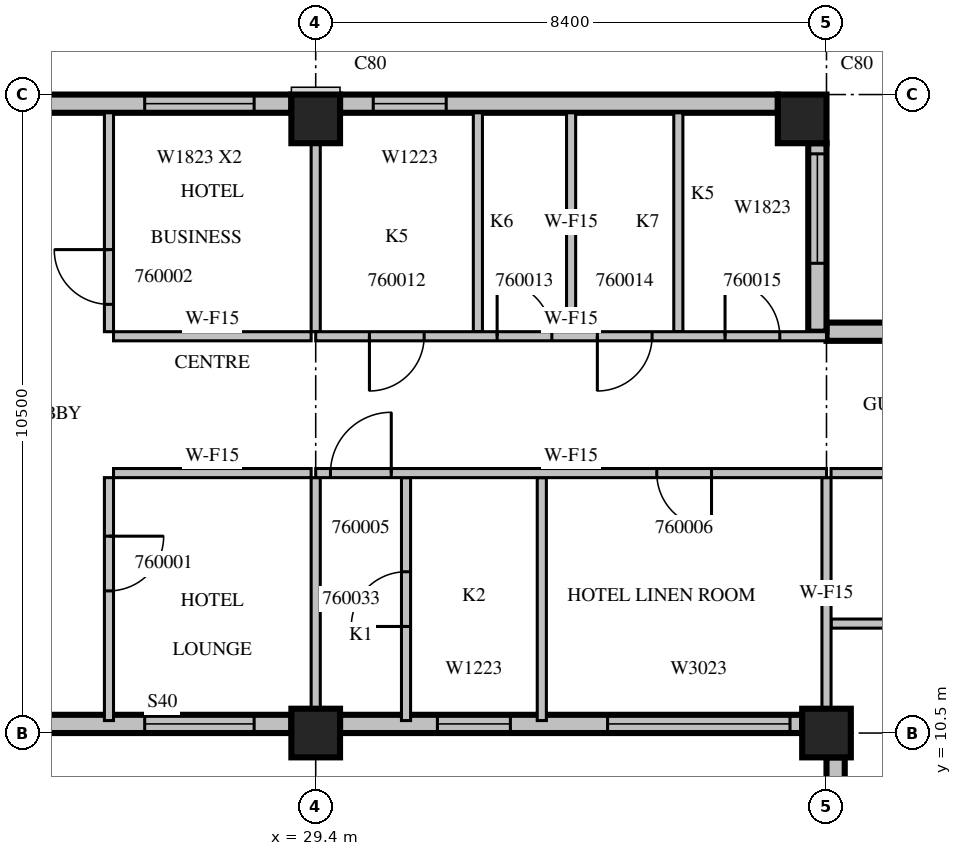
"""IFC4 building model, lengths in metres.
Left out: names, types, materials, properties, quantities, classifications, styles, units other than length and angle.
Written with IfcOpenShell. Run it as: python <this file> out.ifc"""

import sys

from ifc_helpers import new_model, si_unit, direction, frame, frame_2d, origin, origin_2d, place, context, subcontext, project, spatial, rectangle, extrude, source, transform, mapped, element, fill, save


model = new_model("IFC4")
c1 = context("Model", 3, precision=1e-05, world=origin(), true_north=direction((0.0, 1.0)))
c2 = subcontext(c1, "Body", "Model", "MODEL_VIEW")
j1 = project(units=[si_unit("LENGTHUNIT", "METRE"), si_unit("PLANEANGLEUNIT", "RADIAN")], contexts=[c1])
p1 = place(None, origin())
s1 = spatial("IfcSite", under=j1, at=p1, CompositionType="ELEMENT")
p2 = place(p1, origin())
s2 = spatial("IfcBuilding", under=s1, at=p2, CompositionType="ELEMENT")
p3 = place(p2, frame((0.0, 0.0, 261.4)))
s3 = spatial("IfcBuildingStorey", under=s2, at=p3, CompositionType="ELEMENT", Elevation=261.4)
m1 = source(origin(), c2, "Body", "SweptSolid", [
    extrude(rectangle(XDim=0.8, YDim=0.8, at=origin_2d()), origin(), (0.0, 0.0, 1.0), 3.8),
])
for number, where, z_axis, x_axis in (
    (1, (29.4, 10.5, 0.0), (0.0, 0.0, 1.0), (1.0, 0.0, 0.0)),
    (2, (37.8, 10.5, 0.0), (0.0, 0.0, 1.0), (1.0, 0.0, 0.0)),
    (3, (29.4, 20.6, 0.0), (0.0, 0.0, 1.0), (1.0, 0.0, 0.0)),
    (4, (37.4, 20.6, 0.0), (0.0, 0.0, 1.0), (1.0, 0.0, 0.0)),
):
    element("IfcColumn", number, at=place(p3, frame(where, z_axis=z_axis, x_axis=x_axis)), inside=s3, PredefinedType="COLUMN", context=c2, shape_type="MappedRepresentation", body=[
        mapped(m1, transform((0.0, 0.0, 0.0), scale=1.0)),
    ])
m2 = source(origin(), c2, "Body", "SweptSolid", [
    extrude(rectangle(XDim=7.2, YDim=0.3, at=frame_2d((3.6, 0.0))), origin(), (0.0, 0.0, 1.0), 3.4),
])
p4 = place(p3, frame((21.8, 10.65, 0.0), z_axis=(0.0, 0.0, 1.0), x_axis=(1.0, 0.0, 0.0)))
e5 = element("IfcWall", 5, at=p4, inside=s3, PredefinedType="STANDARD", context=c2, shape_type="MappedRepresentation", body=[
    mapped(m2, transform((0.0, 0.0, 0.0), scale=1.0)),
])
m3 = source(origin(), c2, "Body", "SweptSolid", [
    extrude(rectangle(XDim=1.8, YDim=2.3, at=frame_2d((0.9, 1.15))), frame((0.0, 0.16, 0.0), z_axis=(0.0, -1.0, 0.0), x_axis=(1.0, 0.0, 0.0)), (0.0, 0.0, 1.0), 0.32),
])
p5 = place(p4, frame((0.4, 0.0, 0.6)))
e6 = element("IfcOpeningElement", 6, at=p5, cuts=e5, PredefinedType="OPENING", context=c2, shape_type="MappedRepresentation", body=[
    mapped(m3, transform((0.0, 0.0, 0.0), scale=1.0)),
])
p6 = place(p4, frame((4.787, 0.0, 0.6)))
e7 = element("IfcOpeningElement", 7, at=p6, cuts=e5, PredefinedType="OPENING", context=c2, shape_type="MappedRepresentation", body=[
    mapped(m3, transform((0.0, 0.0, 0.0), scale=1.0)),
])
m4 = source(origin(), c2, "Body", "SweptSolid", [
    extrude(rectangle(XDim=7.6, YDim=0.3, at=frame_2d((3.8, 0.0))), origin(), (0.0, 0.0, 1.0), 3.4),
])
p7 = place(p3, frame((29.8, 10.65, 0.0), z_axis=(0.0, 0.0, 1.0), x_axis=(1.0, 0.0, 0.0)))
e8 = element("IfcWall", 8, at=p7, inside=s3, PredefinedType="STANDARD", context=c2, shape_type="MappedRepresentation", body=[
    mapped(m4, transform((0.0, 0.0, 0.0), scale=1.0)),
])
m5 = source(origin(), c2, "Body", "SweptSolid", [
    extrude(rectangle(XDim=1.2, YDim=2.3, at=frame_2d((0.6, 1.15))), frame((0.0, 0.16, 0.0), z_axis=(0.0, -1.0, 0.0), x_axis=(1.0, 0.0, 0.0)), (0.0, 0.0, 1.0), 0.32),
])
p8 = place(p7, frame((1.601, 0.0, 0.6)))
e9 = element("IfcOpeningElement", 9, at=p8, cuts=e8, PredefinedType="OPENING", context=c2, shape_type="MappedRepresentation", body=[
    mapped(m5, transform((0.0, 0.0, 0.0), scale=1.0)),
])
m6 = source(origin(), c2, "Body", "SweptSolid", [
    extrude(rectangle(XDim=3.0, YDim=2.3, at=frame_2d((1.5, 1.15))), frame((0.0, 0.16, 0.0), z_axis=(0.0, -1.0, 0.0), x_axis=(1.0, 0.0, 0.0)), (0.0, 0.0, 1.0), 0.32),
])
p9 = place(p7, frame((4.4, 0.0, 0.6)))
e10 = element("IfcOpeningElement", 10, at=p9, cuts=e8, PredefinedType="OPENING", context=c2, shape_type="MappedRepresentation", body=[
    mapped(m6, transform((0.0, 0.0, 0.0), scale=1.0)),
])
m7 = source(origin(), c2, "Body", "SweptSolid", [
    extrude(rectangle(XDim=9.3, YDim=0.3, at=frame_2d((4.65, 0.0))), origin(), (0.0, 0.0, 1.0), 3.4),
])
p10 = place(p3, frame((37.95, 10.1, 0.0), z_axis=(0.0, 0.0, 1.0), x_axis=(0.0, -1.0, 0.0)))
e11 = element("IfcWall", 11, at=p10, inside=s3, PredefinedType="STANDARD", context=c2, shape_type="MappedRepresentation", body=[
    mapped(m7, transform((0.0, 0.0, 0.0), scale=1.0)),
])
p11 = place(p10, frame((2.013, 0.0, 0.6)))
e12 = element("IfcOpeningElement", 12, at=p11, cuts=e11, PredefinedType="OPENING", context=c2, shape_type="MappedRepresentation", body=[
    mapped(m3, transform((0.0, 0.0, 0.0), scale=1.0)),
])
p12 = place(p10, frame((5.975, 0.0, 0.6)))
e13 = element("IfcOpeningElement", 13, at=p12, cuts=e11, PredefinedType="OPENING", context=c2, shape_type="MappedRepresentation", body=[
    mapped(m6, transform((0.0, 0.0, 0.0), scale=1.0)),
])
m8 = source(origin(), c2, "Body", "SweptSolid", [
    extrude(rectangle(XDim=15.96, YDim=0.3, at=frame_2d((7.98, 0.0))), origin(), (0.0, 0.0, 1.0), 3.4),
])
p13 = place(p3, frame((53.76, 17.1, 0.0), z_axis=(0.0, 0.0, 1.0), x_axis=(-1.0, 0.0, 0.0)))
e14 = element("IfcWall", 14, at=p13, inside=s3, PredefinedType="STANDARD", context=c2, shape_type="MappedRepresentation", body=[
    mapped(m8, transform((0.0, 0.0, 0.0), scale=1.0)),
])
p14 = place(p13, frame((0.6, 0.0, 0.6)))
e15 = element("IfcOpeningElement", 15, at=p14, cuts=e14, PredefinedType="OPENING", context=c2, shape_type="MappedRepresentation", body=[
    mapped(m6, transform((0.0, 0.0, 0.0), scale=1.0)),
])
p15 = place(p13, frame((4.8, 0.0, 0.6)))
e16 = element("IfcOpeningElement", 16, at=p15, cuts=e14, PredefinedType="OPENING", context=c2, shape_type="MappedRepresentation", body=[
    mapped(m6, transform((0.0, 0.0, 0.0), scale=1.0)),
])
m9 = source(origin(), c2, "Body", "SweptSolid", [
    extrude(rectangle(XDim=3.6, YDim=2.3, at=frame_2d((1.8, 1.15))), frame((0.0, 0.16, 0.0), z_axis=(0.0, -1.0, 0.0), x_axis=(1.0, 0.0, 0.0)), (0.0, 0.0, 1.0), 0.32),
])
p16 = place(p13, frame((9.54, 0.0, 0.6)))
e17 = element("IfcOpeningElement", 17, at=p16, cuts=e14, PredefinedType="OPENING", context=c2, shape_type="MappedRepresentation", body=[
    mapped(m9, transform((0.0, 0.0, 0.0), scale=1.0)),
])
m10 = source(origin(), c2, "Body", "SweptSolid", [
    extrude(rectangle(XDim=3.1, YDim=0.3, at=frame_2d((1.55, 0.0))), origin(), (0.0, 0.0, 1.0), 3.4),
])
p17 = place(p3, frame((37.65, 17.1, 0.0), z_axis=(0.0, 0.0, 1.0), x_axis=(0.0, 1.0, 0.0)))
e18 = element("IfcWall", 18, at=p17, inside=s3, PredefinedType="STANDARD", context=c2, shape_type="MappedRepresentation", body=[
    mapped(m10, transform((0.0, 0.0, 0.0), scale=1.0)),
])
p18 = place(p17, frame((1.125, 0.0, 0.6)))
e19 = element("IfcOpeningElement", 19, at=p18, cuts=e18, PredefinedType="OPENING", context=c2, shape_type="MappedRepresentation", body=[
    mapped(m3, transform((0.0, 0.0, 0.0), scale=1.0)),
])
p19 = place(p3, frame((37.0, 20.85, 0.0), z_axis=(0.0, 0.0, 1.0), x_axis=(-1.0, 0.0, 0.0)))
e20 = element("IfcWall", 20, at=p19, inside=s3, PredefinedType="STANDARD", context=c2, shape_type="MappedRepresentation", body=[
    mapped(m2, transform((0.0, 0.0, 0.0), scale=1.0)),
])
p20 = place(p19, frame((5.454, 0.0, 0.6)))
e21 = element("IfcOpeningElement", 21, at=p20, cuts=e20, PredefinedType="OPENING", context=c2, shape_type="MappedRepresentation", body=[
    mapped(m5, transform((0.0, 0.0, 0.0), scale=1.0)),
])
p21 = place(p3, frame((29.0, 20.85, 0.0), z_axis=(0.0, 0.0, 1.0), x_axis=(-1.0, 0.0, 0.0)))
e22 = element("IfcWall", 22, at=p21, inside=s3, PredefinedType="STANDARD", context=c2, shape_type="MappedRepresentation", body=[
    mapped(m2, transform((0.0, 0.0, 0.0), scale=1.0)),
])
p22 = place(p21, frame((0.613, 0.0, 0.6)))
e23 = element("IfcOpeningElement", 23, at=p22, cuts=e22, PredefinedType="OPENING", context=c2, shape_type="MappedRepresentation", body=[
    mapped(m3, transform((0.0, 0.0, 0.0), scale=1.0)),
])
p23 = place(p21, frame((5.0, 0.0, 0.6)))
e24 = element("IfcOpeningElement", 24, at=p23, cuts=e22, PredefinedType="OPENING", context=c2, shape_type="MappedRepresentation", body=[
    mapped(m3, transform((0.0, 0.0, 0.0), scale=1.0)),
])
m11 = source(origin(), c2, "Body", "SweptSolid", [
    extrude(rectangle(XDim=3.995, YDim=0.15, at=frame_2d((1.998, 0.0))), origin(), (0.0, 0.0, 1.0), 3.4),
])
p24 = place(p3, frame((26.0, 14.7, 0.0), z_axis=(0.0, 0.0, 1.0), x_axis=(0.0, -1.0, 0.0)))
e25 = element("IfcWall", 25, at=p24, inside=s3, PredefinedType="PARTITIONING", context=c2, shape_type="MappedRepresentation", body=[
    mapped(m11, transform((0.0, 0.0, 0.0), scale=1.0)),
])
m12 = source(origin(), c2, "Body", "SweptSolid", [
    extrude(rectangle(XDim=0.9, YDim=2.1, at=frame_2d((0.45, 1.05))), frame((0.0, 0.085, 0.0), z_axis=(0.0, -1.0, 0.0), x_axis=(1.0, 0.0, 0.0)), (0.0, 0.0, 1.0), 0.17),
])
p25 = place(p24, frame((0.963, 0.0, 0.0)))
e26 = element("IfcOpeningElement", 26, at=p25, cuts=e25, PredefinedType="OPENING", context=c2, shape_type="MappedRepresentation", body=[
    mapped(m12, transform((0.0, 0.0, 0.0), scale=1.0)),
])
m13 = source(origin(), c2, "Body", "SweptSolid", [
    extrude(rectangle(XDim=3.6, YDim=0.15, at=frame_2d((1.8, 0.0))), origin(), (0.0, 0.0, 1.0), 3.4),
])
p26 = place(p3, frame((26.0, 20.7, 0.0), z_axis=(0.0, 0.0, 1.0), x_axis=(0.0, -1.0, 0.0)))
e27 = element("IfcWall", 27, at=p26, inside=s3, PredefinedType="PARTITIONING", context=c2, shape_type="MappedRepresentation", body=[
    mapped(m13, transform((0.0, 0.0, 0.0), scale=1.0)),
])
p27 = place(p26, frame((2.25, 0.0, 0.0)))
e28 = element("IfcOpeningElement", 28, at=p27, cuts=e27, PredefinedType="OPENING", context=c2, shape_type="MappedRepresentation", body=[
    mapped(m12, transform((0.0, 0.0, 0.0), scale=1.0)),
])
m14 = source(origin(), c2, "Body", "SweptSolid", [
    extrude(rectangle(XDim=3.25, YDim=0.15, at=frame_2d((1.625, 0.0))), origin(), (0.0, 0.0, 1.0), 3.4),
])
for number, where, z_axis, x_axis in (
    (29, (29.325, 14.775, 0.0), (0.0, 0.0, 1.0), (-1.0, 0.0, 0.0)),
    (30, (26.075, 17.025, 0.0), (0.0, 0.0, 1.0), (1.0, 0.0, 0.0)),
):
    element("IfcWall", number, at=place(p3, frame(where, z_axis=z_axis, x_axis=x_axis)), inside=s3, PredefinedType="PARTITIONING", context=c2, shape_type="MappedRepresentation", body=[
        mapped(m14, transform((0.0, 0.0, 0.0), scale=1.0)),
    ])
m15 = source(origin(), c2, "Body", "SweptSolid", [
    extrude(rectangle(XDim=3.801, YDim=0.15, at=frame_2d((1.901, 0.0))), origin(), (0.0, 0.0, 1.0), 3.4),
])
p28 = place(p3, frame((29.4, 10.899, 0.0), z_axis=(0.0, 0.0, 1.0), x_axis=(0.0, 1.0, 0.0)))
e31 = element("IfcWall", 31, at=p28, inside=s3, PredefinedType="PARTITIONING", context=c2, shape_type="MappedRepresentation", body=[
    mapped(m15, transform((0.0, 0.0, 0.0), scale=1.0)),
])
m16 = source(origin(), c2, "Body", "SweptSolid", [
    extrude(rectangle(XDim=3.101, YDim=0.15, at=frame_2d((1.55, 0.0))), origin(), (0.0, 0.0, 1.0), 3.4),
])
p29 = place(p3, frame((29.4, 17.1, 0.0), z_axis=(0.0, 0.0, 1.0), x_axis=(0.0, 1.0, 0.0)))
e32 = element("IfcWall", 32, at=p29, inside=s3, PredefinedType="PARTITIONING", context=c2, shape_type="MappedRepresentation", body=[
    mapped(m16, transform((0.0, 0.0, 0.0), scale=1.0)),
])
m17 = source(origin(), c2, "Body", "SweptSolid", [
    extrude(rectangle(XDim=6.45, YDim=0.15, at=frame_2d((3.225, 0.0))), origin(), (0.0, 0.0, 1.0), 3.4),
])
p30 = place(p3, frame((37.875, 12.3, 0.0), z_axis=(0.0, 0.0, 1.0), x_axis=(1.0, 0.0, 0.0)))
e33 = element("IfcWall", 33, at=p30, inside=s3, PredefinedType="PARTITIONING", context=c2, shape_type="MappedRepresentation", body=[
    mapped(m17, transform((0.0, 0.0, 0.0), scale=1.0)),
])
p31 = place(p3, frame((44.325, 14.775, 0.0), z_axis=(0.0, 0.0, 1.0), x_axis=(-1.0, 0.0, 0.0)))
e34 = element("IfcWall", 34, at=p31, inside=s3, PredefinedType="PARTITIONING", context=c2, shape_type="MappedRepresentation", body=[
    mapped(m17, transform((0.0, 0.0, 0.0), scale=1.0)),
])
p32 = place(p31, frame((2.812, 0.0, 0.0)))
e35 = element("IfcOpeningElement", 35, at=p32, cuts=e34, PredefinedType="OPENING", context=c2, shape_type="MappedRepresentation", body=[
    mapped(m12, transform((0.0, 0.0, 0.0), scale=1.0)),
])
p33 = place(p3, frame((30.885, 10.705, 0.0), z_axis=(0.0, 0.0, 1.0), x_axis=(0.0, 1.0, 0.0)))
e36 = element("IfcWall", 36, at=p33, inside=s3, PredefinedType="PARTITIONING", context=c2, shape_type="MappedRepresentation", body=[
    mapped(m11, transform((0.0, 0.0, 0.0), scale=1.0)),
])
p34 = place(p33, frame((1.548, 0.0, 0.0)))
e37 = element("IfcOpeningElement", 37, at=p34, cuts=e36, PredefinedType="OPENING", context=c2, shape_type="MappedRepresentation", body=[
    mapped(m12, transform((0.0, 0.0, 0.0), scale=1.0)),
])
p35 = place(p3, frame((33.118, 10.705, 0.0), z_axis=(0.0, 0.0, 1.0), x_axis=(0.0, 1.0, 0.0)))
e38 = element("IfcWall", 38, at=p35, inside=s3, PredefinedType="PARTITIONING", context=c2, shape_type="MappedRepresentation", body=[
    mapped(m11, transform((0.0, 0.0, 0.0), scale=1.0)),
])
p36 = place(p3, frame((37.8, 10.899, 0.0), z_axis=(0.0, 0.0, 1.0), x_axis=(0.0, 1.0, 0.0)))
e39 = element("IfcWall", 39, at=p36, inside=s3, PredefinedType="PARTITIONING", context=c2, shape_type="MappedRepresentation", body=[
    mapped(m15, transform((0.0, 0.0, 0.0), scale=1.0)),
])
for number, where, z_axis, x_axis in (
    (40, (32.067, 20.7, 0.0), (0.0, 0.0, 1.0), (0.0, -1.0, 0.0)),
    (41, (35.363, 20.7, 0.0), (0.0, 0.0, 1.0), (0.0, -1.0, 0.0)),
    (42, (33.6, 17.1, 0.0), (0.0, 0.0, 1.0), (0.0, 1.0, 0.0)),
):
    element("IfcWall", number, at=place(p3, frame(where, z_axis=z_axis, x_axis=x_axis)), inside=s3, PredefinedType="PARTITIONING", context=c2, shape_type="MappedRepresentation", body=[
        mapped(m13, transform((0.0, 0.0, 0.0), scale=1.0)),
    ])
m18 = source(origin(), c2, "Body", "SweptSolid", [
    extrude(rectangle(XDim=8.4, YDim=0.15, at=frame_2d((4.2, 0.0))), origin(), (0.0, 0.0, 1.0), 3.4),
])
p37 = place(p3, frame((37.8, 14.775, 0.0), z_axis=(0.0, 0.0, 1.0), x_axis=(-1.0, 0.0, 0.0)))
e43 = element("IfcWall", 43, at=p37, inside=s3, PredefinedType="PARTITIONING", context=c2, shape_type="MappedRepresentation", body=[
    mapped(m18, transform((0.0, 0.0, 0.0), scale=1.0)),
])
m19 = source(origin(), c2, "Body", "SweptSolid", [
    extrude(rectangle(XDim=1.0, YDim=2.1, at=frame_2d((0.5, 1.05))), frame((0.0, 0.085, 0.0), z_axis=(0.0, -1.0, 0.0), x_axis=(1.0, 0.0, 0.0)), (0.0, 0.0, 1.0), 0.17),
])
p38 = place(p37, frame((7.157, 0.0, 0.0)))
e44 = element("IfcOpeningElement", 44, at=p38, cuts=e43, PredefinedType="OPENING", context=c2, shape_type="MappedRepresentation", body=[
    mapped(m19, transform((0.0, 0.0, 0.0), scale=1.0)),
])
p39 = place(p37, frame((1.891, 0.0, 0.0)))
e45 = element("IfcOpeningElement", 45, at=p39, cuts=e43, PredefinedType="OPENING", context=c2, shape_type="MappedRepresentation", body=[
    mapped(m12, transform((0.0, 0.0, 0.0), scale=1.0)),
])
p40 = place(p3, frame((29.4, 17.025, 0.0), z_axis=(0.0, 0.0, 1.0), x_axis=(1.0, 0.0, 0.0)))
e46 = element("IfcWall", 46, at=p40, inside=s3, PredefinedType="PARTITIONING", context=c2, shape_type="MappedRepresentation", body=[
    mapped(m18, transform((0.0, 0.0, 0.0), scale=1.0)),
])
p41 = place(p40, frame((0.883, 0.0, 0.0)))
e47 = element("IfcOpeningElement", 47, at=p41, cuts=e46, PredefinedType="OPENING", context=c2, shape_type="MappedRepresentation", body=[
    mapped(m12, transform((0.0, 0.0, 0.0), scale=1.0)),
])
p42 = place(p40, frame((2.983, 0.0, 0.0)))
e48 = element("IfcOpeningElement", 48, at=p42, cuts=e46, PredefinedType="OPENING", context=c2, shape_type="MappedRepresentation", body=[
    mapped(m12, transform((0.0, 0.0, 0.0), scale=1.0)),
])
p43 = place(p40, frame((4.632, 0.0, 0.0)))
e49 = element("IfcOpeningElement", 49, at=p43, cuts=e46, PredefinedType="OPENING", context=c2, shape_type="MappedRepresentation", body=[
    mapped(m12, transform((0.0, 0.0, 0.0), scale=1.0)),
])
p44 = place(p40, frame((6.732, 0.0, 0.0)))
e50 = element("IfcOpeningElement", 50, at=p44, cuts=e46, PredefinedType="OPENING", context=c2, shape_type="MappedRepresentation", body=[
    mapped(m12, transform((0.0, 0.0, 0.0), scale=1.0)),
])
m20 = source(origin(), c2, "Body", "SweptSolid", [
    extrude(rectangle(XDim=1.8, YDim=2.3, at=frame_2d((0.9, 1.15))), frame((0.0, 0.03, 0.0), z_axis=(0.0, -1.0, 0.0), x_axis=(1.0, 0.0, 0.0)), (0.0, 0.0, 1.0), 0.06),
])
p45 = place(p6, origin())
e51 = element("IfcWindow", 51, at=p45, inside=s3, PartitioningType="SINGLE_PANEL", PredefinedType="WINDOW", context=c2, shape_type="MappedRepresentation", body=[
    mapped(m20, transform((0.0, 0.0, 0.0), scale=1.0)),
])
fill(e7, e51)
m21 = source(origin(), c2, "Body", "SweptSolid", [
    extrude(rectangle(XDim=1.2, YDim=2.3, at=frame_2d((0.6, 1.15))), frame((0.0, 0.03, 0.0), z_axis=(0.0, -1.0, 0.0), x_axis=(1.0, 0.0, 0.0)), (0.0, 0.0, 1.0), 0.06),
])
p46 = place(p8, origin())
e52 = element("IfcWindow", 52, at=p46, inside=s3, PartitioningType="SINGLE_PANEL", PredefinedType="WINDOW", context=c2, shape_type="MappedRepresentation", body=[
    mapped(m21, transform((0.0, 0.0, 0.0), scale=1.0)),
])
fill(e9, e52)
m22 = source(origin(), c2, "Body", "SweptSolid", [
    extrude(rectangle(XDim=3.0, YDim=2.3, at=frame_2d((1.5, 1.15))), frame((0.0, 0.03, 0.0), z_axis=(0.0, -1.0, 0.0), x_axis=(1.0, 0.0, 0.0)), (0.0, 0.0, 1.0), 0.06),
])
p47 = place(p9, origin())
e53 = element("IfcWindow", 53, at=p47, inside=s3, PartitioningType="SINGLE_PANEL", PredefinedType="WINDOW", context=c2, shape_type="MappedRepresentation", body=[
    mapped(m22, transform((0.0, 0.0, 0.0), scale=1.0)),
])
fill(e10, e53)
p48 = place(p18, origin())
e54 = element("IfcWindow", 54, at=p48, inside=s3, PartitioningType="SINGLE_PANEL", PredefinedType="WINDOW", context=c2, shape_type="MappedRepresentation", body=[
    mapped(m20, transform((0.0, 0.0, 0.0), scale=1.0)),
])
fill(e19, e54)
p49 = place(p20, origin())
e55 = element("IfcWindow", 55, at=p49, inside=s3, PartitioningType="SINGLE_PANEL", PredefinedType="WINDOW", context=c2, shape_type="MappedRepresentation", body=[
    mapped(m21, transform((0.0, 0.0, 0.0), scale=1.0)),
])
fill(e21, e55)
p50 = place(p22, origin())
e56 = element("IfcWindow", 56, at=p50, inside=s3, PartitioningType="SINGLE_PANEL", PredefinedType="WINDOW", context=c2, shape_type="MappedRepresentation", body=[
    mapped(m20, transform((0.0, 0.0, 0.0), scale=1.0)),
])
fill(e23, e56)
m23 = source(origin(), c2, "Body", "SweptSolid", [
    extrude(rectangle(XDim=0.9, YDim=2.1, at=frame_2d((0.45, 1.05))), frame((0.0, 0.025, 0.0), z_axis=(0.0, -1.0, 0.0), x_axis=(1.0, 0.0, 0.0)), (0.0, 0.0, 1.0), 0.05),
])
p51 = place(p25, origin())
e57 = element("IfcDoor", 57, at=p51, inside=s3, OperationType="SINGLE_SWING_LEFT", PredefinedType="DOOR", context=c2, shape_type="MappedRepresentation", body=[
    mapped(m23, transform((0.0, 0.0, 0.0), scale=1.0)),
])
fill(e26, e57)
p52 = place(p27, origin())
e58 = element("IfcDoor", 58, at=p52, inside=s3, OperationType="SINGLE_SWING_RIGHT", PredefinedType="DOOR", context=c2, shape_type="MappedRepresentation", body=[
    mapped(m23, transform((0.0, 0.0, 0.0), scale=1.0)),
])
fill(e28, e58)
m24 = source(origin(), c2, "Body", "SweptSolid", [
    extrude(rectangle(XDim=1.0, YDim=2.1, at=frame_2d((0.5, 1.05))), frame((0.0, 0.025, 0.0), z_axis=(0.0, -1.0, 0.0), x_axis=(1.0, 0.0, 0.0)), (0.0, 0.0, 1.0), 0.05),
])
p53 = place(p38, origin())
e59 = element("IfcDoor", 59, at=p53, inside=s3, OperationType="SINGLE_SWING_RIGHT", PredefinedType="DOOR", context=c2, shape_type="MappedRepresentation", body=[
    mapped(m24, transform((0.0, 0.0, 0.0), scale=1.0)),
])
fill(e44, e59)
p54 = place(p39, origin())
e60 = element("IfcDoor", 60, at=p54, inside=s3, OperationType="SINGLE_SWING_LEFT", PredefinedType="DOOR", context=c2, shape_type="MappedRepresentation", body=[
    mapped(m23, transform((0.0, 0.0, 0.0), scale=1.0)),
])
fill(e45, e60)
p55 = place(p41, origin())
e61 = element("IfcDoor", 61, at=p55, inside=s3, OperationType="SINGLE_SWING_RIGHT", PredefinedType="DOOR", context=c2, shape_type="MappedRepresentation", body=[
    mapped(m23, transform((0.0, 0.0, 0.0), scale=1.0)),
])
fill(e47, e61)
p56 = place(p42, origin())
e62 = element("IfcDoor", 62, at=p56, inside=s3, OperationType="SINGLE_SWING_LEFT", PredefinedType="DOOR", context=c2, shape_type="MappedRepresentation", body=[
    mapped(m23, transform((0.0, 0.0, 0.0), scale=1.0)),
])
fill(e48, e62)
p57 = place(p43, origin())
e63 = element("IfcDoor", 63, at=p57, inside=s3, OperationType="SINGLE_SWING_RIGHT", PredefinedType="DOOR", context=c2, shape_type="MappedRepresentation", body=[
    mapped(m23, transform((0.0, 0.0, 0.0), scale=1.0)),
])
fill(e49, e63)
p58 = place(p44, origin())
e64 = element("IfcDoor", 64, at=p58, inside=s3, OperationType="SINGLE_SWING_LEFT", PredefinedType="DOOR", context=c2, shape_type="MappedRepresentation", body=[
    mapped(m23, transform((0.0, 0.0, 0.0), scale=1.0)),
])
fill(e50, e64)
p59 = place(p34, origin())
e65 = element("IfcDoor", 65, at=p59, inside=s3, OperationType="SINGLE_SWING_LEFT", PredefinedType="DOOR", context=c2, shape_type="MappedRepresentation", body=[
    mapped(m23, transform((0.0, 0.0, 0.0), scale=1.0)),
])
fill(e37, e65)
save(model, sys.argv[1])
